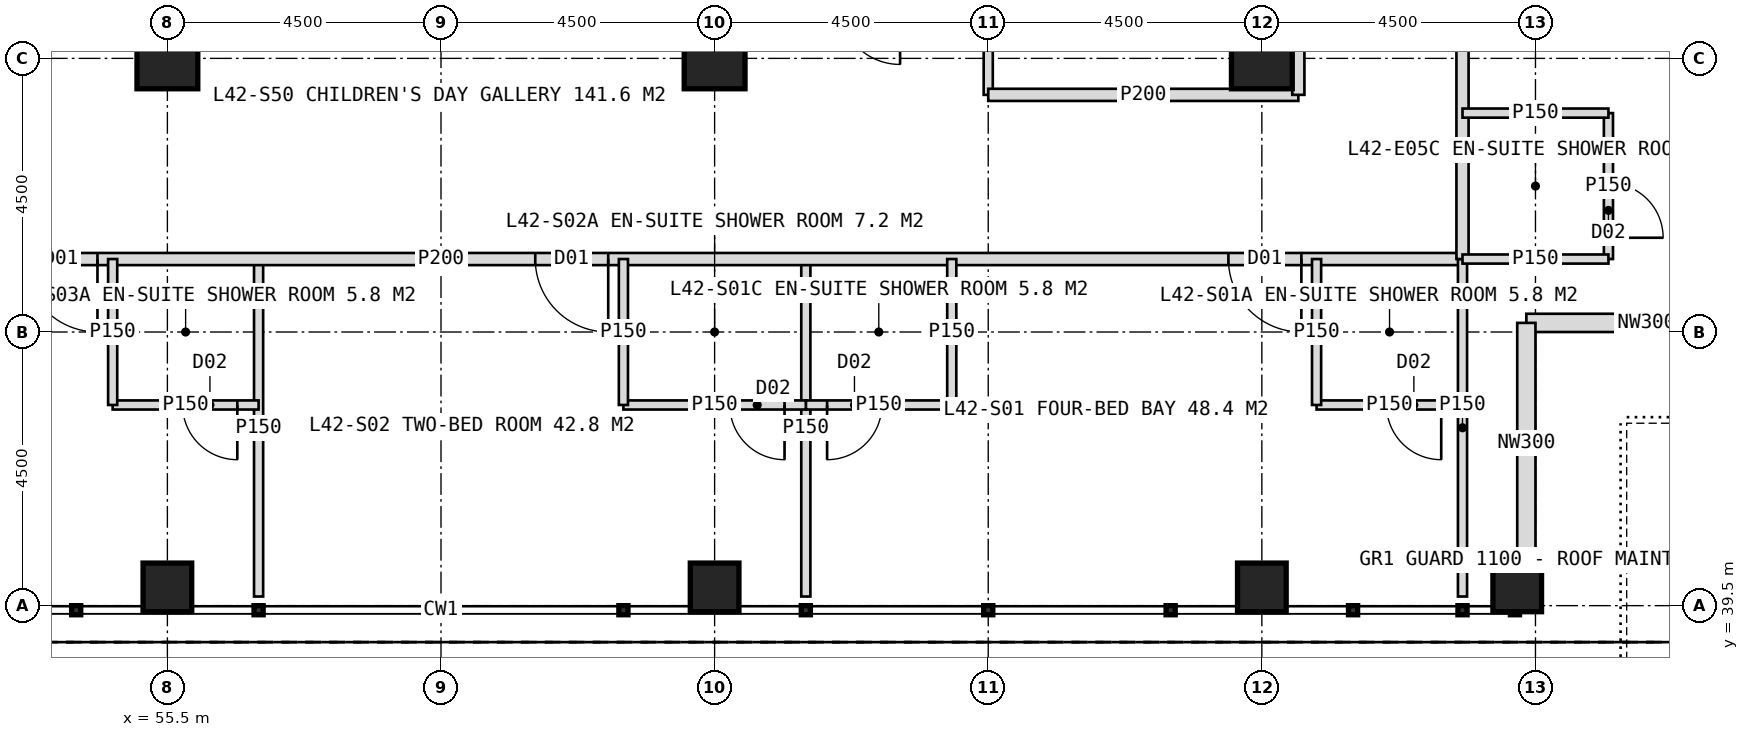
"""IFC4 building model, lengths in metres.
Left out: names, types, materials, properties, quantities, classifications, styles, units other than length and angle.
Written with IfcOpenShell. Run it as: python <this file> out.ifc"""

import sys

from ifc_helpers import new_model, si_unit, direction, frame, frame_2d, origin, origin_2d, place, context, subcontext, project, spatial, rectangle, hollow_rectangle, extrude, element, fill, save


model = new_model("IFC4")
c1 = context("Model", 3, precision=1e-05, world=origin(), true_north=direction((0.0, 1.0)))
c2 = subcontext(c1, "Body", "Model", "MODEL_VIEW")
j1 = project(units=[si_unit("LENGTHUNIT", "METRE"), si_unit("PLANEANGLEUNIT", "RADIAN")], contexts=[c1])
p1 = place(None, origin())
s1 = spatial("IfcSite", under=j1, at=p1, CompositionType="ELEMENT")
p2 = place(p1, origin())
s2 = spatial("IfcBuilding", under=s1, at=p2, CompositionType="ELEMENT")
p3 = place(p2, frame((0.0, 0.0, 177.0)))
s3 = spatial("IfcBuildingStorey", under=s2, at=p3, CompositionType="ELEMENT", Elevation=177.0)
for number, where, z_axis, x_axis in (
    (1, (73.5, 48.5, 0.0), (0.0, 0.0, 1.0), (1.0, 0.0, 0.0)),
    (2, (55.5, 48.5, 0.0), (0.0, 0.0, 1.0), (1.0, 0.0, 0.0)),
    (3, (64.5, 48.5, 0.0), (0.0, 0.0, 1.0), (1.0, 0.0, 0.0)),
):
    element("IfcColumn", number, at=place(p3, frame(where, z_axis=z_axis, x_axis=x_axis)), inside=s3, PredefinedType="COLUMN", context=c2, shape_type="SweptSolid", body=[
        extrude(hollow_rectangle(XDim=1.0, YDim=1.0, WallThickness=0.1, at=origin_2d()), origin(), (0.0, 0.0, 1.0), 4.0),
    ])
for number, where, z_axis, x_axis in (
    (4, (55.5, 39.8, 0.0), (0.0, 0.0, 1.0), (1.0, 0.0, 0.0)),
    (5, (64.5, 39.8, 0.0), (0.0, 0.0, 1.0), (1.0, 0.0, 0.0)),
    (6, (73.5, 39.8, 0.0), (0.0, 0.0, 1.0), (1.0, 0.0, 0.0)),
    (7, (77.7, 39.8, 0.0), (0.0, 0.0, 1.0), (1.0, 0.0, 0.0)),
):
    element("IfcColumn", number, at=place(p3, frame(where, z_axis=z_axis, x_axis=x_axis)), inside=s3, PredefinedType="COLUMN", context=c2, shape_type="SweptSolid", body=[
        extrude(hollow_rectangle(XDim=0.8, YDim=0.8, WallThickness=0.08, at=origin_2d()), origin(), (0.0, 0.0, 1.0), 4.0),
    ])
for number, where, z_axis, x_axis in (
    (8, (81.8, 44.15, 0.0), (0.0, 0.0, 1.0), (-1.0, 0.0, 0.0)),
    (9, (77.85, 44.15, 0.0), (0.0, 0.0, 1.0), (0.0, -1.0, 0.0)),
):
    element("IfcWall", number, at=place(p3, frame(where, z_axis=z_axis, x_axis=x_axis)), inside=s3, PredefinedType="ELEMENTEDWALL", context=c2, shape_type="SweptSolid", body=[
        extrude(rectangle(XDim=3.95, YDim=0.3, at=frame_2d((1.975, 0.0))), origin(), (0.0, 0.0, 1.0), 2.85),
    ])
for number, where, z_axis, x_axis in (
    (10, (66.0, 45.2, 0.0), (0.0, 0.0, 1.0), (0.0, -1.0, 0.0)),
    (11, (57.0, 45.2, 0.0), (0.0, 0.0, 1.0), (0.0, -1.0, 0.0)),
):
    element("IfcWall", number, at=place(p3, frame(where, z_axis=z_axis, x_axis=x_axis)), inside=s3, PredefinedType="PARTITIONING", context=c2, shape_type="SweptSolid", body=[
        extrude(rectangle(XDim=5.55, YDim=0.15, at=frame_2d((2.775, 0.0))), origin(), (0.0, 0.0, 1.0), 3.75),
    ])
p4 = place(p3, frame((76.8, 45.2, 0.0), z_axis=(0.0, 0.0, 1.0), x_axis=(-1.0, 0.0, 0.0)))
e12 = element("IfcWall", 12, at=p4, inside=s3, PredefinedType="PARTITIONING", context=c2, shape_type="SweptSolid", body=[
    extrude(rectangle(XDim=33.6, YDim=0.2, at=frame_2d((16.8, 0.0))), origin(), (0.0, 0.0, 1.0), 3.75),
])
p5 = place(p4, frame((2.65, 0.0, 0.0)))
e13 = element("IfcOpeningElement", 13, at=p5, cuts=e12, PredefinedType="OPENING", context=c2, shape_type="SweptSolid", body=[
    extrude(rectangle(XDim=1.2, YDim=2.2, at=frame_2d((0.6, 1.1))), frame((0.0, 0.11, 0.0), z_axis=(0.0, -1.0, 0.0), x_axis=(1.0, 0.0, 0.0)), (0.0, 0.0, 1.0), 0.22),
])
p6 = place(p4, frame((14.05, 0.0, 0.0)))
e14 = element("IfcOpeningElement", 14, at=p6, cuts=e12, PredefinedType="OPENING", context=c2, shape_type="SweptSolid", body=[
    extrude(rectangle(XDim=1.2, YDim=2.2, at=frame_2d((0.6, 1.1))), frame((0.0, 0.11, 0.0), z_axis=(0.0, -1.0, 0.0), x_axis=(1.0, 0.0, 0.0)), (0.0, 0.0, 1.0), 0.22),
])
p7 = place(p4, frame((22.45, 0.0, 0.0)))
e15 = element("IfcOpeningElement", 15, at=p7, cuts=e12, PredefinedType="OPENING", context=c2, shape_type="SweptSolid", body=[
    extrude(rectangle(XDim=1.2, YDim=2.2, at=frame_2d((0.6, 1.1))), frame((0.0, 0.11, 0.0), z_axis=(0.0, -1.0, 0.0), x_axis=(1.0, 0.0, 0.0)), (0.0, 0.0, 1.0), 0.22),
])
p8 = place(p3, frame((76.8, 45.2, 0.0), z_axis=(0.0, 0.0, 1.0), x_axis=(0.0, -1.0, 0.0)))
e16 = element("IfcWall", 16, at=p8, inside=s3, PredefinedType="PARTITIONING", context=c2, shape_type="SweptSolid", body=[
    extrude(rectangle(XDim=5.55, YDim=0.15, at=frame_2d((2.775, 0.0))), origin(), (0.0, 0.0, 1.0), 3.75),
])
p9 = place(p3, frame((76.8, 42.8, 0.0), z_axis=(0.0, 0.0, 1.0), x_axis=(-1.0, 0.0, 0.0)))
e17 = element("IfcWall", 17, at=p9, inside=s3, PredefinedType="PARTITIONING", context=c2, shape_type="SweptSolid", body=[
    extrude(rectangle(XDim=2.4, YDim=0.15, at=frame_2d((1.2, 0.0))), origin(), (0.0, 0.0, 1.0), 3.75),
])
p10 = place(p9, frame((0.35, 0.0, 0.0)))
e18 = element("IfcOpeningElement", 18, at=p10, cuts=e17, PredefinedType="OPENING", context=c2, shape_type="SweptSolid", body=[
    extrude(rectangle(XDim=0.9, YDim=2.1, at=frame_2d((0.45, 1.05))), frame((0.0, 0.085, 0.0), z_axis=(0.0, -1.0, 0.0), x_axis=(1.0, 0.0, 0.0)), (0.0, 0.0, 1.0), 0.17),
])
p11 = place(p3, frame((74.4, 45.2, 0.0), z_axis=(0.0, 0.0, 1.0), x_axis=(0.0, -1.0, 0.0)))
e19 = element("IfcWall", 19, at=p11, inside=s3, PredefinedType="PARTITIONING", context=c2, shape_type="SweptSolid", body=[
    extrude(rectangle(XDim=2.4, YDim=0.15, at=frame_2d((1.2, 0.0))), origin(), (0.0, 0.0, 1.0), 3.75),
])
p12 = place(p3, frame((68.4, 42.8, 0.0), z_axis=(0.0, 0.0, 1.0), x_axis=(-1.0, 0.0, 0.0)))
e20 = element("IfcWall", 20, at=p12, inside=s3, PredefinedType="PARTITIONING", context=c2, shape_type="SweptSolid", body=[
    extrude(rectangle(XDim=2.4, YDim=0.15, at=frame_2d((1.2, 0.0))), origin(), (0.0, 0.0, 1.0), 3.75),
])
p13 = place(p12, frame((1.15, 0.0, 0.0)))
e21 = element("IfcOpeningElement", 21, at=p13, cuts=e20, PredefinedType="OPENING", context=c2, shape_type="SweptSolid", body=[
    extrude(rectangle(XDim=0.9, YDim=2.1, at=frame_2d((0.45, 1.05))), frame((0.0, 0.085, 0.0), z_axis=(0.0, -1.0, 0.0), x_axis=(1.0, 0.0, 0.0)), (0.0, 0.0, 1.0), 0.17),
])
p14 = place(p3, frame((68.4, 45.2, 0.0), z_axis=(0.0, 0.0, 1.0), x_axis=(0.0, -1.0, 0.0)))
e22 = element("IfcWall", 22, at=p14, inside=s3, PredefinedType="PARTITIONING", context=c2, shape_type="SweptSolid", body=[
    extrude(rectangle(XDim=2.4, YDim=0.15, at=frame_2d((1.2, 0.0))), origin(), (0.0, 0.0, 1.0), 3.75),
])
p15 = place(p3, frame((66.0, 42.8, 0.0), z_axis=(0.0, 0.0, 1.0), x_axis=(-1.0, 0.0, 0.0)))
e23 = element("IfcWall", 23, at=p15, inside=s3, PredefinedType="PARTITIONING", context=c2, shape_type="SweptSolid", body=[
    extrude(rectangle(XDim=3.0, YDim=0.15, at=frame_2d((1.5, 0.0))), origin(), (0.0, 0.0, 1.0), 3.75),
])
p16 = place(p15, frame((0.35, 0.0, 0.0)))
e24 = element("IfcOpeningElement", 24, at=p16, cuts=e23, PredefinedType="OPENING", context=c2, shape_type="SweptSolid", body=[
    extrude(rectangle(XDim=0.9, YDim=2.1, at=frame_2d((0.45, 1.05))), frame((0.0, 0.085, 0.0), z_axis=(0.0, -1.0, 0.0), x_axis=(1.0, 0.0, 0.0)), (0.0, 0.0, 1.0), 0.17),
])
p17 = place(p3, frame((63.0, 45.2, 0.0), z_axis=(0.0, 0.0, 1.0), x_axis=(0.0, -1.0, 0.0)))
e25 = element("IfcWall", 25, at=p17, inside=s3, PredefinedType="PARTITIONING", context=c2, shape_type="SweptSolid", body=[
    extrude(rectangle(XDim=2.4, YDim=0.15, at=frame_2d((1.2, 0.0))), origin(), (0.0, 0.0, 1.0), 3.75),
])
p18 = place(p3, frame((57.0, 42.8, 0.0), z_axis=(0.0, 0.0, 1.0), x_axis=(-1.0, 0.0, 0.0)))
e26 = element("IfcWall", 26, at=p18, inside=s3, PredefinedType="PARTITIONING", context=c2, shape_type="SweptSolid", body=[
    extrude(rectangle(XDim=2.4, YDim=0.15, at=frame_2d((1.2, 0.0))), origin(), (0.0, 0.0, 1.0), 3.75),
])
p19 = place(p18, frame((0.35, 0.0, 0.0)))
e27 = element("IfcOpeningElement", 27, at=p19, cuts=e26, PredefinedType="OPENING", context=c2, shape_type="SweptSolid", body=[
    extrude(rectangle(XDim=0.9, YDim=2.1, at=frame_2d((0.45, 1.05))), frame((0.0, 0.085, 0.0), z_axis=(0.0, -1.0, 0.0), x_axis=(1.0, 0.0, 0.0)), (0.0, 0.0, 1.0), 0.17),
])
p20 = place(p3, frame((54.6, 45.2, 0.0), z_axis=(0.0, 0.0, 1.0), x_axis=(0.0, -1.0, 0.0)))
e28 = element("IfcWall", 28, at=p20, inside=s3, PredefinedType="PARTITIONING", context=c2, shape_type="SweptSolid", body=[
    extrude(rectangle(XDim=2.4, YDim=0.15, at=frame_2d((1.2, 0.0))), origin(), (0.0, 0.0, 1.0), 3.75),
])
p21 = place(p3, frame((69.0, 53.0, 0.0), z_axis=(0.0, 0.0, 1.0), x_axis=(0.0, -1.0, 0.0)))
e29 = element("IfcWall", 29, at=p21, inside=s3, PredefinedType="PARTITIONING", context=c2, shape_type="SweptSolid", body=[
    extrude(rectangle(XDim=5.1, YDim=0.15, at=frame_2d((2.55, 0.0))), origin(), (0.0, 0.0, 1.0), 3.75),
])
p22 = place(p3, frame((74.1, 47.9, 0.0), z_axis=(0.0, 0.0, 1.0), x_axis=(-1.0, 0.0, 0.0)))
e30 = element("IfcWall", 30, at=p22, inside=s3, PredefinedType="PARTITIONING", context=c2, shape_type="SweptSolid", body=[
    extrude(rectangle(XDim=5.1, YDim=0.2, at=frame_2d((2.55, 0.0))), origin(), (0.0, 0.0, 1.0), 3.75),
])
p23 = place(p3, frame((76.8, 78.8, 0.0), z_axis=(0.0, 0.0, 1.0), x_axis=(0.0, -1.0, 0.0)))
e31 = element("IfcWall", 31, at=p23, inside=s3, PredefinedType="PARTITIONING", context=c2, shape_type="SweptSolid", body=[
    extrude(rectangle(XDim=33.6, YDim=0.2, at=frame_2d((16.8, 0.0))), origin(), (0.0, 0.0, 1.0), 3.75),
])
p24 = place(p23, frame((2.65, 0.0, 0.0)))
e32 = element("IfcOpeningElement", 32, at=p24, cuts=e31, PredefinedType="OPENING", context=c2, shape_type="SweptSolid", body=[
    extrude(rectangle(XDim=1.2, YDim=2.2, at=frame_2d((0.6, 1.1))), frame((0.0, 0.11, 0.0), z_axis=(0.0, -1.0, 0.0), x_axis=(1.0, 0.0, 0.0)), (0.0, 0.0, 1.0), 0.22),
])
p25 = place(p23, frame((7.45, 0.0, 0.0)))
e33 = element("IfcOpeningElement", 33, at=p25, cuts=e31, PredefinedType="OPENING", context=c2, shape_type="SweptSolid", body=[
    extrude(rectangle(XDim=1.2, YDim=2.2, at=frame_2d((0.6, 1.1))), frame((0.0, 0.11, 0.0), z_axis=(0.0, -1.0, 0.0), x_axis=(1.0, 0.0, 0.0)), (0.0, 0.0, 1.0), 0.22),
])
p26 = place(p23, frame((13.45, 0.0, 0.0)))
e34 = element("IfcOpeningElement", 34, at=p26, cuts=e31, PredefinedType="OPENING", context=c2, shape_type="SweptSolid", body=[
    extrude(rectangle(XDim=1.2, YDim=2.2, at=frame_2d((0.6, 1.1))), frame((0.0, 0.11, 0.0), z_axis=(0.0, -1.0, 0.0), x_axis=(1.0, 0.0, 0.0)), (0.0, 0.0, 1.0), 0.22),
])
p27 = place(p23, frame((19.45, 0.0, 0.0)))
e35 = element("IfcOpeningElement", 35, at=p27, cuts=e31, PredefinedType="OPENING", context=c2, shape_type="SweptSolid", body=[
    extrude(rectangle(XDim=1.2, YDim=2.2, at=frame_2d((0.6, 1.1))), frame((0.0, 0.11, 0.0), z_axis=(0.0, -1.0, 0.0), x_axis=(1.0, 0.0, 0.0)), (0.0, 0.0, 1.0), 0.22),
])
p28 = place(p23, frame((25.45, 0.0, 0.0)))
e36 = element("IfcOpeningElement", 36, at=p28, cuts=e31, PredefinedType="OPENING", context=c2, shape_type="SweptSolid", body=[
    extrude(rectangle(XDim=1.2, YDim=2.2, at=frame_2d((0.6, 1.1))), frame((0.0, 0.11, 0.0), z_axis=(0.0, -1.0, 0.0), x_axis=(1.0, 0.0, 0.0)), (0.0, 0.0, 1.0), 0.22),
])
p29 = place(p3, frame((79.2, 47.6, 0.0), z_axis=(0.0, 0.0, 1.0), x_axis=(0.0, -1.0, 0.0)))
e37 = element("IfcWall", 37, at=p29, inside=s3, PredefinedType="PARTITIONING", context=c2, shape_type="SweptSolid", body=[
    extrude(rectangle(XDim=2.4, YDim=0.15, at=frame_2d((1.2, 0.0))), origin(), (0.0, 0.0, 1.0), 3.75),
])
p30 = place(p29, frame((1.15, 0.0, 0.0)))
e38 = element("IfcOpeningElement", 38, at=p30, cuts=e37, PredefinedType="OPENING", context=c2, shape_type="SweptSolid", body=[
    extrude(rectangle(XDim=0.9, YDim=2.1, at=frame_2d((0.45, 1.05))), frame((0.0, 0.085, 0.0), z_axis=(0.0, -1.0, 0.0), x_axis=(1.0, 0.0, 0.0)), (0.0, 0.0, 1.0), 0.17),
])
for number, where, z_axis, x_axis in (
    (39, (76.8, 47.6, 0.0), (0.0, 0.0, 1.0), (1.0, 0.0, 0.0)),
    (40, (76.8, 45.2, 0.0), (0.0, 0.0, 1.0), (1.0, 0.0, 0.0)),
):
    element("IfcWall", number, at=place(p3, frame(where, z_axis=z_axis, x_axis=x_axis)), inside=s3, PredefinedType="PARTITIONING", context=c2, shape_type="SweptSolid", body=[
        extrude(rectangle(XDim=2.4, YDim=0.15, at=frame_2d((1.2, 0.0))), origin(), (0.0, 0.0, 1.0), 3.75),
    ])
p31 = place(p3, frame((74.1, 62.0, 0.0), z_axis=(0.0, 0.0, 1.0), x_axis=(0.0, -1.0, 0.0)))
e41 = element("IfcWall", 41, at=p31, inside=s3, PredefinedType="PARTITIONING", context=c2, shape_type="SweptSolid", body=[
    extrude(rectangle(XDim=14.1, YDim=0.2, at=frame_2d((7.05, 0.0))), origin(), (0.0, 0.0, 1.0), 3.75),
])
p32 = place(p31, frame((1.45, 0.0, 0.0)))
e42 = element("IfcOpeningElement", 42, at=p32, cuts=e41, PredefinedType="OPENING", context=c2, shape_type="SweptSolid", body=[
    extrude(rectangle(XDim=1.0, YDim=2.1, at=frame_2d((0.5, 1.05))), frame((0.0, 0.11, 0.0), z_axis=(0.0, -1.0, 0.0), x_axis=(1.0, 0.0, 0.0)), (0.0, 0.0, 1.0), 0.22),
])
p33 = place(p31, frame((11.05, 0.0, 0.0)))
e43 = element("IfcOpeningElement", 43, at=p33, cuts=e41, PredefinedType="OPENING", context=c2, shape_type="SweptSolid", body=[
    extrude(rectangle(XDim=1.0, YDim=2.1, at=frame_2d((0.5, 1.05))), frame((0.0, 0.11, 0.0), z_axis=(0.0, -1.0, 0.0), x_axis=(1.0, 0.0, 0.0)), (0.0, 0.0, 1.0), 0.22),
])
p34 = place(p5, origin())
e44 = element("IfcDoor", 44, at=p34, inside=s3, OperationType="SINGLE_SWING_LEFT", PredefinedType="DOOR", context=c2, shape_type="SweptSolid", body=[
    extrude(rectangle(XDim=1.2, YDim=2.2, at=frame_2d((0.6, 1.1))), frame((0.0, 0.025, 0.0), z_axis=(0.0, -1.0, 0.0), x_axis=(1.0, 0.0, 0.0)), (0.0, 0.0, 1.0), 0.05),
])
fill(e13, e44)
p35 = place(p10, origin())
e45 = element("IfcDoor", 45, at=p35, inside=s3, OperationType="SINGLE_SWING_LEFT", PredefinedType="DOOR", context=c2, shape_type="SweptSolid", body=[
    extrude(rectangle(XDim=0.9, YDim=2.1, at=frame_2d((0.45, 1.05))), frame((0.0, 0.025, 0.0), z_axis=(0.0, -1.0, 0.0), x_axis=(1.0, 0.0, 0.0)), (0.0, 0.0, 1.0), 0.05),
])
fill(e18, e45)
p36 = place(p13, origin())
e46 = element("IfcDoor", 46, at=p36, inside=s3, OperationType="SINGLE_SWING_RIGHT", PredefinedType="DOOR", context=c2, shape_type="SweptSolid", body=[
    extrude(rectangle(XDim=0.9, YDim=2.1, at=frame_2d((0.45, 1.05))), frame((0.0, 0.025, 0.0), z_axis=(0.0, -1.0, 0.0), x_axis=(1.0, 0.0, 0.0)), (0.0, 0.0, 1.0), 0.05),
])
fill(e21, e46)
p37 = place(p6, origin())
e47 = element("IfcDoor", 47, at=p37, inside=s3, OperationType="SINGLE_SWING_LEFT", PredefinedType="DOOR", context=c2, shape_type="SweptSolid", body=[
    extrude(rectangle(XDim=1.2, YDim=2.2, at=frame_2d((0.6, 1.1))), frame((0.0, 0.025, 0.0), z_axis=(0.0, -1.0, 0.0), x_axis=(1.0, 0.0, 0.0)), (0.0, 0.0, 1.0), 0.05),
])
fill(e14, e47)
p38 = place(p16, origin())
e48 = element("IfcDoor", 48, at=p38, inside=s3, OperationType="SINGLE_SWING_LEFT", PredefinedType="DOOR", context=c2, shape_type="SweptSolid", body=[
    extrude(rectangle(XDim=0.9, YDim=2.1, at=frame_2d((0.45, 1.05))), frame((0.0, 0.025, 0.0), z_axis=(0.0, -1.0, 0.0), x_axis=(1.0, 0.0, 0.0)), (0.0, 0.0, 1.0), 0.05),
])
fill(e24, e48)
p39 = place(p7, origin())
e49 = element("IfcDoor", 49, at=p39, inside=s3, OperationType="SINGLE_SWING_LEFT", PredefinedType="DOOR", context=c2, shape_type="SweptSolid", body=[
    extrude(rectangle(XDim=1.2, YDim=2.2, at=frame_2d((0.6, 1.1))), frame((0.0, 0.025, 0.0), z_axis=(0.0, -1.0, 0.0), x_axis=(1.0, 0.0, 0.0)), (0.0, 0.0, 1.0), 0.05),
])
fill(e15, e49)
p40 = place(p19, origin())
e50 = element("IfcDoor", 50, at=p40, inside=s3, OperationType="SINGLE_SWING_LEFT", PredefinedType="DOOR", context=c2, shape_type="SweptSolid", body=[
    extrude(rectangle(XDim=0.9, YDim=2.1, at=frame_2d((0.45, 1.05))), frame((0.0, 0.025, 0.0), z_axis=(0.0, -1.0, 0.0), x_axis=(1.0, 0.0, 0.0)), (0.0, 0.0, 1.0), 0.05),
])
fill(e27, e50)
p41 = place(p30, origin())
e51 = element("IfcDoor", 51, at=p41, inside=s3, OperationType="SINGLE_SWING_RIGHT", PredefinedType="DOOR", context=c2, shape_type="SweptSolid", body=[
    extrude(rectangle(XDim=0.9, YDim=2.1, at=frame_2d((0.45, 1.05))), frame((0.0, 0.025, 0.0), z_axis=(0.0, -1.0, 0.0), x_axis=(1.0, 0.0, 0.0)), (0.0, 0.0, 1.0), 0.05),
])
fill(e38, e51)
save(model, sys.argv[1])
